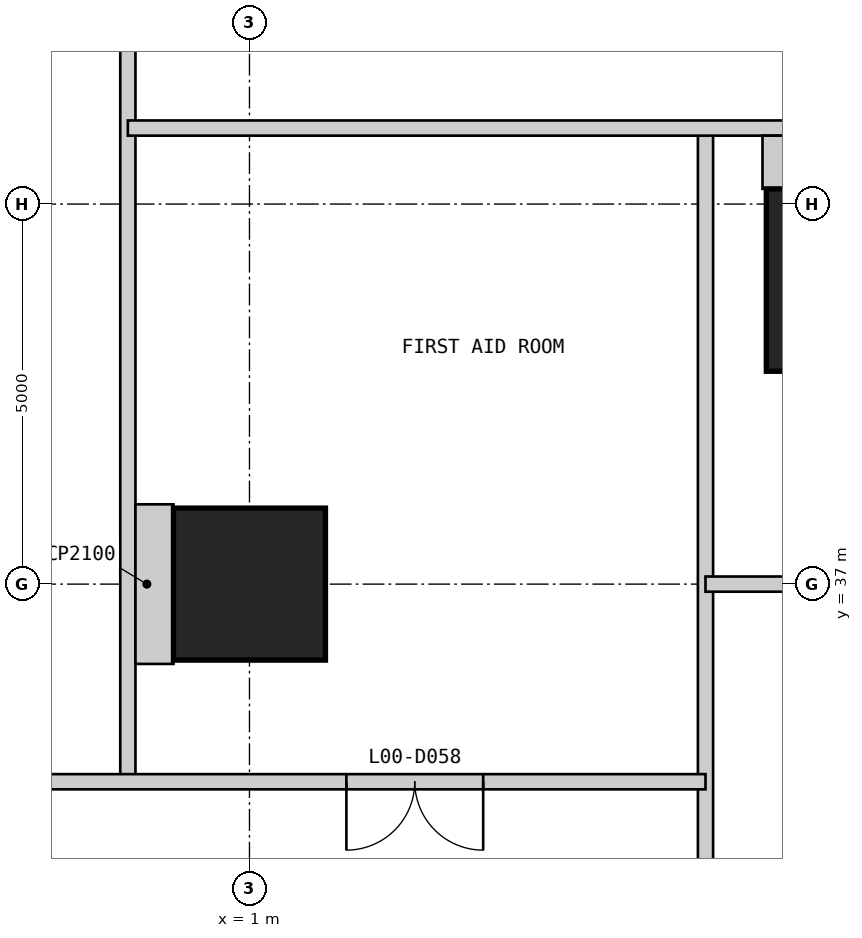
"""IFC4 building model, lengths in metres.
Left out: names, types, materials, properties, quantities, classifications, styles, units other than length and angle.
Written with IfcOpenShell. Run it as: python <this file> out.ifc"""

import sys

from ifc_helpers import new_model, si_unit, direction, frame, frame_2d, origin, origin_2d, place, context, subcontext, project, spatial, rectangle, extrude, element, fill, save


model = new_model("IFC4")
c1 = context("Model", 3, precision=1e-05, world=origin(), true_north=direction((0.0, 1.0)))
c2 = subcontext(c1, "Body", "Model", "MODEL_VIEW")
j1 = project(units=[si_unit("LENGTHUNIT", "METRE"), si_unit("PLANEANGLEUNIT", "RADIAN")], contexts=[c1])
p1 = place(None, origin())
s1 = spatial("IfcSite", under=j1, at=p1, CompositionType="ELEMENT")
p2 = place(p1, origin())
s2 = spatial("IfcBuilding", under=s1, at=p2, CompositionType="ELEMENT")
p3 = place(p2, origin())
s3 = spatial("IfcBuildingStorey", under=s2, at=p3, CompositionType="ELEMENT", Elevation=0.0)
p4 = place(p3, frame((9.0, 41.0, 0.0), z_axis=(0.0, 0.0, 1.0), x_axis=(1.0, 0.0, 0.0)))
e1 = element("IfcColumn", 1, at=p4, inside=s3, PredefinedType="COLUMN", context=c2, shape_type="SweptSolid", body=[
    extrude(rectangle(XDim=2.4, YDim=2.4, at=origin_2d()), origin(), (0.0, 0.0, 1.0), 7.0),
])
p5 = place(p3, frame((1.0, 37.0, 0.0), z_axis=(0.0, 0.0, 1.0), x_axis=(1.0, 0.0, 0.0)))
e2 = element("IfcColumn", 2, at=p5, inside=s3, PredefinedType="COLUMN", context=c2, shape_type="SweptSolid", body=[
    extrude(rectangle(XDim=2.0, YDim=2.0, at=origin_2d()), origin(), (0.0, 0.0, 1.0), 7.0),
])
p6 = place(p3, frame((-0.6, 34.4, 0.0), z_axis=(0.0, 0.0, 1.0), x_axis=(0.0, 1.0, 0.0)))
e3 = element("IfcWall", 3, at=p6, inside=s3, PredefinedType="PARTITIONING", context=c2, shape_type="SweptSolid", body=[
    extrude(rectangle(XDim=23.2, YDim=0.2, at=frame_2d((11.6, 0.0))), origin(), (0.0, 0.0, 1.0), 6.7),
])
p7 = place(p3, frame((7.0, 22.0, 0.0), z_axis=(0.0, 0.0, 1.0), x_axis=(0.0, 1.0, 0.0)))
e4 = element("IfcWall", 4, at=p7, inside=s3, PredefinedType="PARTITIONING", context=c2, shape_type="SweptSolid", body=[
    extrude(rectangle(XDim=21.0, YDim=0.2, at=frame_2d((10.5, 0.0))), origin(), (0.0, 0.0, 1.0), 6.043),
])
p8 = place(p7, frame((4.05, 0.0, 0.0)))
e5 = element("IfcOpeningElement", 5, at=p8, cuts=e4, PredefinedType="OPENING", context=c2, shape_type="SweptSolid", body=[
    extrude(rectangle(XDim=1.8, YDim=2.4, at=frame_2d((0.9, 1.2))), frame((0.0, 0.11, 0.0), z_axis=(0.0, -1.0, 0.0), x_axis=(1.0, 0.0, 0.0)), (0.0, 0.0, 1.0), 0.22),
])
p9 = place(p3, frame((-15.25, 34.4, 0.0), z_axis=(0.0, 0.0, 1.0), x_axis=(1.0, 0.0, 0.0)))
e6 = element("IfcWall", 6, at=p9, inside=s3, PredefinedType="PARTITIONING", context=c2, shape_type="SweptSolid", body=[
    extrude(rectangle(XDim=22.25, YDim=0.2, at=frame_2d((11.125, 0.0))), origin(), (0.0, 0.0, 1.0), 6.7),
])
p10 = place(p9, frame((17.525, 0.0, 0.0)))
e7 = element("IfcOpeningElement", 7, at=p10, cuts=e6, PredefinedType="OPENING", context=c2, shape_type="SweptSolid", body=[
    extrude(rectangle(XDim=1.8, YDim=2.4, at=frame_2d((0.9, 1.2))), frame((0.0, 0.11, 0.0), z_axis=(0.0, -1.0, 0.0), x_axis=(1.0, 0.0, 0.0)), (0.0, 0.0, 1.0), 0.22),
])
p11 = place(p9, frame((10.325, 0.0, 0.0)))
e8 = element("IfcOpeningElement", 8, at=p11, cuts=e6, PredefinedType="OPENING", context=c2, shape_type="SweptSolid", body=[
    extrude(rectangle(XDim=1.8, YDim=2.4, at=frame_2d((0.9, 1.2))), frame((0.0, 0.11, 0.0), z_axis=(0.0, -1.0, 0.0), x_axis=(1.0, 0.0, 0.0)), (0.0, 0.0, 1.0), 0.22),
])
p12 = place(p9, frame((3.025, 0.0, 0.0)))
e9 = element("IfcOpeningElement", 9, at=p12, cuts=e6, PredefinedType="OPENING", context=c2, shape_type="SweptSolid", body=[
    extrude(rectangle(XDim=1.8, YDim=2.4, at=frame_2d((0.9, 1.2))), frame((0.0, 0.11, 0.0), z_axis=(0.0, -1.0, 0.0), x_axis=(1.0, 0.0, 0.0)), (0.0, 0.0, 1.0), 0.22),
])
p13 = place(p3, frame((7.0, 37.0, 0.0), z_axis=(0.0, 0.0, 1.0), x_axis=(1.0, 0.0, 0.0)))
e10 = element("IfcWall", 10, at=p13, inside=s3, PredefinedType="PARTITIONING", context=c2, shape_type="SweptSolid", body=[
    extrude(rectangle(XDim=6.0, YDim=0.2, at=frame_2d((3.0, 0.0))), origin(), (0.0, 0.0, 1.0), 5.853),
])
p14 = place(p3, frame((-0.6, 43.0, 0.0), z_axis=(0.0, 0.0, 1.0), x_axis=(1.0, 0.0, 0.0)))
e11 = element("IfcWall", 11, at=p14, inside=s3, PredefinedType="PARTITIONING", context=c2, shape_type="SweptSolid", body=[
    extrude(rectangle(XDim=14.6, YDim=0.2, at=frame_2d((7.3, 0.0))), origin(), (0.0, 0.0, 1.0), 6.7),
])
p15 = place(p3, frame((-0.5, 37.0, 0.0), z_axis=(0.0, 0.0, 1.0), x_axis=(1.0, 0.0, 0.0)))
e12 = element("IfcWall", 12, at=p15, inside=s3, PredefinedType="PARTITIONING", context=c2, shape_type="SweptSolid", body=[
    extrude(rectangle(XDim=0.5, YDim=2.1, at=frame_2d((0.25, 0.0))), origin(), (0.0, 0.0, 1.0), 6.7),
])
p16 = place(p3, frame((9.0, 42.9, 0.0), z_axis=(0.0, 0.0, 1.0), x_axis=(0.0, -1.0, 0.0)))
e13 = element("IfcWall", 13, at=p16, inside=s3, PredefinedType="PARTITIONING", context=c2, shape_type="SweptSolid", body=[
    extrude(rectangle(XDim=0.7, YDim=2.5, at=frame_2d((0.35, 0.0))), origin(), (0.0, 0.0, 1.0), 6.7),
])
p17 = place(p10, frame((1.8, 0.0, 0.0), z_axis=(0.0, 0.0, 1.0), x_axis=(-1.0, 0.0, 0.0)))
e14 = element("IfcDoor", 14, at=p17, inside=s3, OperationType="DOUBLE_DOOR_SINGLE_SWING", PredefinedType="DOOR", context=c2, shape_type="SweptSolid", body=[
    extrude(rectangle(XDim=1.8, YDim=2.4, at=frame_2d((0.9, 1.2))), frame((0.0, 0.025, 0.0), z_axis=(0.0, -1.0, 0.0), x_axis=(1.0, 0.0, 0.0)), (0.0, 0.0, 1.0), 0.05),
])
fill(e7, e14)
save(model, sys.argv[1])
